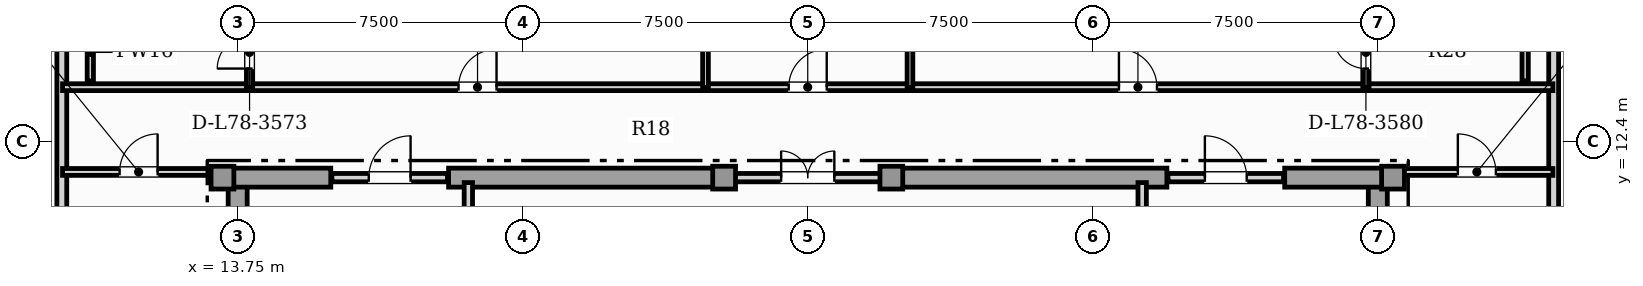
"""IFC4 building model, lengths in metres.
Left out: names, types, materials, properties, quantities, classifications, styles, units other than length and angle.
Written with IfcOpenShell. Run it as: python <this file> out.ifc"""

import sys

from ifc_helpers import new_model, si_unit, direction, frame, frame_2d, origin, origin_2d, place, context, subcontext, project, spatial, rectangle, extrude, element, fill, save


model = new_model("IFC4")
c1 = context("Model", 3, precision=1e-05, world=origin(), true_north=direction((0.0, 1.0)))
c2 = subcontext(c1, "Body", "Model", "MODEL_VIEW")
j1 = project(units=[si_unit("LENGTHUNIT", "METRE"), si_unit("PLANEANGLEUNIT", "RADIAN")], contexts=[c1])
p1 = place(None, origin())
s1 = spatial("IfcSite", under=j1, at=p1, CompositionType="ELEMENT")
p2 = place(p1, origin())
s2 = spatial("IfcBuilding", under=s1, at=p2, CompositionType="ELEMENT")
p3 = place(p2, frame((0.0, 0.0, 316.9)))
s3 = spatial("IfcBuildingStorey", under=s2, at=p3, CompositionType="ELEMENT", Elevation=316.9)
for number, where, z_axis, x_axis in (
    (1, (13.75, 0.92, 0.0), (0.0, 0.0, 1.0), (0.0, 1.0, 0.0)),
    (2, (43.75, 0.92, 0.0), (0.0, 0.0, 1.0), (0.0, 1.0, 0.0)),
):
    element("IfcWall", number, at=place(p3, frame(where, z_axis=z_axis, x_axis=x_axis)), inside=s3, PredefinedType="SHEAR", context=c2, shape_type="SweptSolid", body=[
        extrude(rectangle(XDim=10.53, YDim=0.5, at=frame_2d((5.265, 0.0))), origin(), (0.0, 0.0, 1.0), 3.65),
    ])
p4 = place(p3, frame((13.25, 11.45, 0.0), z_axis=(0.0, 0.0, 1.0), x_axis=(1.0, 0.0, 0.0)))
e3 = element("IfcWall", 3, at=p4, inside=s3, PredefinedType="SHEAR", context=c2, shape_type="SweptSolid", body=[
    extrude(rectangle(XDim=2.95, YDim=0.5, at=frame_2d((1.475, 0.0))), origin(), (0.0, 0.0, 1.0), 3.65),
])
for number, where, z_axis, x_axis in (
    (4, (19.3, 11.45, 0.0), (0.0, 0.0, 1.0), (1.0, 0.0, 0.0)),
    (5, (30.9, 11.45, 0.0), (0.0, 0.0, 1.0), (1.0, 0.0, 0.0)),
):
    element("IfcWall", number, at=place(p3, frame(where, z_axis=z_axis, x_axis=x_axis)), inside=s3, PredefinedType="SHEAR", context=c2, shape_type="SweptSolid", body=[
        extrude(rectangle(XDim=7.3, YDim=0.5, at=frame_2d((3.65, 0.0))), origin(), (0.0, 0.0, 1.0), 3.65),
    ])
p5 = place(p3, frame((41.3, 11.45, 0.0), z_axis=(0.0, 0.0, 1.0), x_axis=(1.0, 0.0, 0.0)))
e6 = element("IfcWall", 6, at=p5, inside=s3, PredefinedType="SHEAR", context=c2, shape_type="SweptSolid", body=[
    extrude(rectangle(XDim=2.95, YDim=0.5, at=frame_2d((1.475, 0.0))), origin(), (0.0, 0.0, 1.0), 3.65),
])
for number, where, z_axis, x_axis in (
    (7, (13.35, 11.45, 0.0), (0.0, 0.0, 1.0), (1.0, 0.0, 0.0)),
    (8, (44.15, 11.45, 0.0), (0.0, 0.0, 1.0), (1.0, 0.0, 0.0)),
    (9, (26.55, 11.45, 0.0), (0.0, 0.0, 1.0), (1.0, 0.0, 0.0)),
    (10, (30.95, 11.45, 0.0), (0.0, 0.0, 1.0), (1.0, 0.0, 0.0)),
):
    element("IfcColumn", number, at=place(p3, frame(where, z_axis=z_axis, x_axis=x_axis)), inside=s3, PredefinedType="COLUMN", context=c2, shape_type="SweptSolid", body=[
        extrude(rectangle(XDim=0.6, YDim=0.6, at=origin_2d()), origin(), (0.0, 0.0, 1.0), 3.85),
    ])
p6 = place(p3, frame((48.377, 3.24, 0.0), z_axis=(0.0, 0.0, 1.0), x_axis=(0.0, 1.0, 0.0)))
e11 = element("IfcWall", 11, at=p6, inside=s3, PredefinedType="SOLIDWALL", context=c2, shape_type="SweptSolid", body=[
    extrude(rectangle(XDim=26.402, YDim=0.26, at=frame_2d((13.201, 0.0))), origin(), (0.0, 0.0, 1.0), 3.65),
])
p7 = place(p6, frame((12.856, 0.0, 0.88)))
e12 = element("IfcOpeningElement", 12, at=p7, cuts=e11, PredefinedType="OPENING", context=c2, shape_type="SweptSolid", body=[
    extrude(rectangle(XDim=1.65, YDim=2.0, at=frame_2d((0.825, 1.0))), frame((0.0, 0.14, 0.0), z_axis=(0.0, -1.0, 0.0), x_axis=(1.0, 0.0, 0.0)), (0.0, 0.0, 1.0), 0.28),
])
p8 = place(p6, frame((15.274, 0.0, 0.88)))
e13 = element("IfcOpeningElement", 13, at=p8, cuts=e11, PredefinedType="OPENING", context=c2, shape_type="SweptSolid", body=[
    extrude(rectangle(XDim=1.65, YDim=2.0, at=frame_2d((0.825, 1.0))), frame((0.0, 0.14, 0.0), z_axis=(0.0, -1.0, 0.0), x_axis=(1.0, 0.0, 0.0)), (0.0, 0.0, 1.0), 0.28),
])
p9 = place(p6, frame((17.961, 0.0, 0.88)))
e14 = element("IfcOpeningElement", 14, at=p9, cuts=e11, PredefinedType="OPENING", context=c2, shape_type="SweptSolid", body=[
    extrude(rectangle(XDim=1.65, YDim=2.0, at=frame_2d((0.825, 1.0))), frame((0.0, 0.14, 0.0), z_axis=(0.0, -1.0, 0.0), x_axis=(1.0, 0.0, 0.0)), (0.0, 0.0, 1.0), 0.28),
])
p10 = place(p6, frame((21.212, 0.0, 0.88)))
e15 = element("IfcOpeningElement", 15, at=p10, cuts=e11, PredefinedType="OPENING", context=c2, shape_type="SweptSolid", body=[
    extrude(rectangle(XDim=1.65, YDim=2.0, at=frame_2d((0.825, 1.0))), frame((0.0, 0.14, 0.0), z_axis=(0.0, -1.0, 0.0), x_axis=(1.0, 0.0, 0.0)), (0.0, 0.0, 1.0), 0.28),
])
p11 = place(p3, frame((9.123, 29.642, 0.0), z_axis=(0.0, 0.0, 1.0), x_axis=(0.0, -1.0, 0.0)))
e16 = element("IfcWall", 16, at=p11, inside=s3, PredefinedType="SOLIDWALL", context=c2, shape_type="SweptSolid", body=[
    extrude(rectangle(XDim=26.402, YDim=0.26, at=frame_2d((13.201, 0.0))), origin(), (0.0, 0.0, 1.0), 3.65),
])
p12 = place(p11, frame((20.352, 0.0, 0.85)))
e17 = element("IfcOpeningElement", 17, at=p12, cuts=e16, PredefinedType="OPENING", context=c2, shape_type="SweptSolid", body=[
    extrude(rectangle(XDim=2.4, YDim=2.0, at=frame_2d((1.2, 1.0))), frame((0.0, 0.14, 0.0), z_axis=(0.0, -1.0, 0.0), x_axis=(1.0, 0.0, 0.0)), (0.0, 0.0, 1.0), 0.28),
])
p13 = place(p11, frame((10.19, 0.0, 0.88)))
e18 = element("IfcOpeningElement", 18, at=p13, cuts=e16, PredefinedType="OPENING", context=c2, shape_type="SweptSolid", body=[
    extrude(rectangle(XDim=1.65, YDim=2.0, at=frame_2d((0.825, 1.0))), frame((0.0, 0.14, 0.0), z_axis=(0.0, -1.0, 0.0), x_axis=(1.0, 0.0, 0.0)), (0.0, 0.0, 1.0), 0.28),
])
p14 = place(p11, frame((7.34, 0.0, 0.88)))
e19 = element("IfcOpeningElement", 19, at=p14, cuts=e16, PredefinedType="OPENING", context=c2, shape_type="SweptSolid", body=[
    extrude(rectangle(XDim=1.65, YDim=2.0, at=frame_2d((0.825, 1.0))), frame((0.0, 0.14, 0.0), z_axis=(0.0, -1.0, 0.0), x_axis=(1.0, 0.0, 0.0)), (0.0, 0.0, 1.0), 0.28),
])
p15 = place(p11, frame((3.721, 0.0, 0.88)))
e20 = element("IfcOpeningElement", 20, at=p15, cuts=e16, PredefinedType="OPENING", context=c2, shape_type="SweptSolid", body=[
    extrude(rectangle(XDim=1.65, YDim=2.0, at=frame_2d((0.825, 1.0))), frame((0.0, 0.14, 0.0), z_axis=(0.0, -1.0, 0.0), x_axis=(1.0, 0.0, 0.0)), (0.0, 0.0, 1.0), 0.28),
])
p16 = place(p3, frame((19.82, 8.52, 0.0), z_axis=(0.0, 0.0, 1.0), x_axis=(0.0, 1.0, 0.0)))
e21 = element("IfcWall", 21, at=p16, inside=s3, PredefinedType="SOLIDWALL", context=c2, shape_type="SweptSolid", body=[
    extrude(rectangle(XDim=2.8, YDim=0.22, at=frame_2d((1.4, 0.0))), origin(), (0.0, 0.0, 1.0), 3.106),
])
p17 = place(p16, frame((0.85, 0.0, 0.0)))
e22 = element("IfcOpeningElement", 22, at=p17, cuts=e21, PredefinedType="OPENING", context=c2, shape_type="SweptSolid", body=[
    extrude(rectangle(XDim=1.1, YDim=2.2, at=frame_2d((0.55, 1.1))), frame((0.0, 0.12, 0.0), z_axis=(0.0, -1.0, 0.0), x_axis=(1.0, 0.0, 0.0)), (0.0, 0.0, 1.0), 0.24),
])
p18 = place(p3, frame((37.55, 8.52, 0.0), z_axis=(0.0, 0.0, 1.0), x_axis=(0.0, 1.0, 0.0)))
e23 = element("IfcWall", 23, at=p18, inside=s3, PredefinedType="SOLIDWALL", context=c2, shape_type="SweptSolid", body=[
    extrude(rectangle(XDim=2.8, YDim=0.22, at=frame_2d((1.4, 0.0))), origin(), (0.0, 0.0, 1.0), 3.106),
])
p19 = place(p18, frame((0.85, 0.0, 0.0)))
e24 = element("IfcOpeningElement", 24, at=p19, cuts=e23, PredefinedType="OPENING", context=c2, shape_type="SweptSolid", body=[
    extrude(rectangle(XDim=1.1, YDim=2.2, at=frame_2d((0.55, 1.1))), frame((0.0, 0.12, 0.0), z_axis=(0.0, -1.0, 0.0), x_axis=(1.0, 0.0, 0.0)), (0.0, 0.0, 1.0), 0.24),
])
p20 = place(p3, frame((16.23, 11.45, 0.0), z_axis=(0.0, 0.0, 1.0), x_axis=(1.0, 0.0, 0.0)))
e25 = element("IfcWall", 25, at=p20, inside=s3, PredefinedType="SOLIDWALL", context=c2, shape_type="SweptSolid", body=[
    extrude(rectangle(XDim=3.04, YDim=0.22, at=frame_2d((1.52, 0.0))), origin(), (0.0, 0.0, 1.0), 3.65),
])
p21 = place(p20, frame((0.97, 0.0, 0.0)))
e26 = element("IfcOpeningElement", 26, at=p21, cuts=e25, PredefinedType="OPENING", context=c2, shape_type="SweptSolid", body=[
    extrude(rectangle(XDim=1.1, YDim=2.2, at=frame_2d((0.55, 1.1))), frame((0.0, 0.12, 0.0), z_axis=(0.0, -1.0, 0.0), x_axis=(1.0, 0.0, 0.0)), (0.0, 0.0, 1.0), 0.24),
])
p22 = place(p3, frame((26.63, 11.45, 0.0), z_axis=(0.0, 0.0, 1.0), x_axis=(1.0, 0.0, 0.0)))
e27 = element("IfcWall", 27, at=p22, inside=s3, PredefinedType="SOLIDWALL", context=c2, shape_type="SweptSolid", body=[
    extrude(rectangle(XDim=4.24, YDim=0.22, at=frame_2d((2.12, 0.0))), origin(), (0.0, 0.0, 1.0), 3.65),
])
p23 = place(p22, frame((1.42, 0.0, 0.0)))
e28 = element("IfcOpeningElement", 28, at=p23, cuts=e27, PredefinedType="OPENING", context=c2, shape_type="SweptSolid", body=[
    extrude(rectangle(XDim=1.4, YDim=2.2, at=frame_2d((0.7, 1.1))), frame((0.0, 0.12, 0.0), z_axis=(0.0, -1.0, 0.0), x_axis=(1.0, 0.0, 0.0)), (0.0, 0.0, 1.0), 0.24),
])
p24 = place(p3, frame((38.23, 11.45, 0.0), z_axis=(0.0, 0.0, 1.0), x_axis=(1.0, 0.0, 0.0)))
e29 = element("IfcWall", 29, at=p24, inside=s3, PredefinedType="SOLIDWALL", context=c2, shape_type="SweptSolid", body=[
    extrude(rectangle(XDim=3.04, YDim=0.22, at=frame_2d((1.52, 0.0))), origin(), (0.0, 0.0, 1.0), 3.65),
])
p25 = place(p24, frame((0.97, 0.0, 0.0)))
e30 = element("IfcOpeningElement", 30, at=p25, cuts=e29, PredefinedType="OPENING", context=c2, shape_type="SweptSolid", body=[
    extrude(rectangle(XDim=1.1, YDim=2.2, at=frame_2d((0.55, 1.1))), frame((0.0, 0.12, 0.0), z_axis=(0.0, -1.0, 0.0), x_axis=(1.0, 0.0, 0.0)), (0.0, 0.0, 1.0), 0.24),
])
p26 = place(p3, frame((9.143, 11.6, 0.0), z_axis=(0.0, 0.0, 1.0), x_axis=(1.0, 0.0, 0.0)))
e31 = element("IfcWall", 31, at=p26, inside=s3, PredefinedType="PARTITIONING", context=c2, shape_type="SweptSolid", body=[
    extrude(rectangle(XDim=4.002, YDim=0.18, at=frame_2d((2.001, 0.0))), origin(), (0.0, 0.0, 1.0), 3.65),
])
p27 = place(p26, frame((1.501, 0.0, 0.0)))
e32 = element("IfcOpeningElement", 32, at=p27, cuts=e31, PredefinedType="OPENING", context=c2, shape_type="SweptSolid", body=[
    extrude(rectangle(XDim=1.0, YDim=2.15, at=frame_2d((0.5, 1.075))), frame((0.0, 0.1, 0.0), z_axis=(0.0, -1.0, 0.0), x_axis=(1.0, 0.0, 0.0)), (0.0, 0.0, 1.0), 0.2),
])
p28 = place(p3, frame((44.355, 11.6, 0.0), z_axis=(0.0, 0.0, 1.0), x_axis=(1.0, 0.0, 0.0)))
e33 = element("IfcWall", 33, at=p28, inside=s3, PredefinedType="PARTITIONING", context=c2, shape_type="SweptSolid", body=[
    extrude(rectangle(XDim=4.002, YDim=0.18, at=frame_2d((2.001, 0.0))), origin(), (0.0, 0.0, 1.0), 3.65),
])
p29 = place(p28, frame((1.501, 0.0, 0.0)))
e34 = element("IfcOpeningElement", 34, at=p29, cuts=e33, PredefinedType="OPENING", context=c2, shape_type="SweptSolid", body=[
    extrude(rectangle(XDim=1.0, YDim=2.15, at=frame_2d((0.5, 1.075))), frame((0.0, 0.1, 0.0), z_axis=(0.0, -1.0, 0.0), x_axis=(1.0, 0.0, 0.0)), (0.0, 0.0, 1.0), 0.2),
])
p30 = place(p3, frame((14.058, 13.83, 0.0), z_axis=(0.0, 0.0, 1.0), x_axis=(1.0, 0.0, 0.0)))
e35 = element("IfcWall", 35, at=p30, inside=s3, PredefinedType="PARTITIONING", context=c2, shape_type="SweptSolid", body=[
    extrude(rectangle(XDim=12.007, YDim=0.18, at=frame_2d((6.003, 0.0))), origin(), (0.0, 0.0, 1.0), 3.65),
])
p31 = place(p30, frame((5.503, 0.0, 0.0)))
e36 = element("IfcOpeningElement", 36, at=p31, cuts=e35, PredefinedType="OPENING", context=c2, shape_type="SweptSolid", body=[
    extrude(rectangle(XDim=1.0, YDim=2.15, at=frame_2d((0.5, 1.075))), frame((0.0, 0.1, 0.0), z_axis=(0.0, -1.0, 0.0), x_axis=(1.0, 0.0, 0.0)), (0.0, 0.0, 1.0), 0.2),
])
p32 = place(p3, frame((31.435, 13.83, 0.0), z_axis=(0.0, 0.0, 1.0), x_axis=(1.0, 0.0, 0.0)))
e37 = element("IfcWall", 37, at=p32, inside=s3, PredefinedType="PARTITIONING", context=c2, shape_type="SweptSolid", body=[
    extrude(rectangle(XDim=12.007, YDim=0.18, at=frame_2d((6.003, 0.0))), origin(), (0.0, 0.0, 1.0), 3.65),
])
p33 = place(p32, frame((5.503, 0.0, 0.0)))
e38 = element("IfcOpeningElement", 38, at=p33, cuts=e37, PredefinedType="OPENING", context=c2, shape_type="SweptSolid", body=[
    extrude(rectangle(XDim=1.0, YDim=2.15, at=frame_2d((0.5, 1.075))), frame((0.0, 0.1, 0.0), z_axis=(0.0, -1.0, 0.0), x_axis=(1.0, 0.0, 0.0)), (0.0, 0.0, 1.0), 0.2),
])
p34 = place(p3, frame((26.095, 13.83, 0.0), z_axis=(0.0, 0.0, 1.0), x_axis=(1.0, 0.0, 0.0)))
e39 = element("IfcWall", 39, at=p34, inside=s3, PredefinedType="PARTITIONING", context=c2, shape_type="SweptSolid", body=[
    extrude(rectangle(XDim=5.31, YDim=0.18, at=frame_2d((2.655, 0.0))), origin(), (0.0, 0.0, 1.0), 3.65),
])
p35 = place(p34, frame((2.155, 0.0, 0.0)))
e40 = element("IfcOpeningElement", 40, at=p35, cuts=e39, PredefinedType="OPENING", context=c2, shape_type="SweptSolid", body=[
    extrude(rectangle(XDim=1.0, YDim=2.15, at=frame_2d((0.5, 1.075))), frame((0.0, 0.1, 0.0), z_axis=(0.0, -1.0, 0.0), x_axis=(1.0, 0.0, 0.0)), (0.0, 0.0, 1.0), 0.2),
])
for number, where, z_axis, x_axis in (
    (41, (9.143, 13.83, 0.0), (0.0, 0.0, 1.0), (1.0, 0.0, 0.0)),
    (42, (43.472, 13.83, 0.0), (0.0, 0.0, 1.0), (1.0, 0.0, 0.0)),
):
    element("IfcWall", number, at=place(p3, frame(where, z_axis=z_axis, x_axis=x_axis)), inside=s3, PredefinedType="PARTITIONING", context=c2, shape_type="SweptSolid", body=[
        extrude(rectangle(XDim=4.885, YDim=0.18, at=frame_2d((2.443, 0.0))), origin(), (0.0, 0.0, 1.0), 3.65),
    ])
p36 = place(p3, frame((26.06, 13.825, 0.0), z_axis=(0.0, 0.0, 1.0), x_axis=(0.0, 1.0, 0.0)))
e43 = element("IfcWall", 43, at=p36, inside=s3, PredefinedType="PARTITIONING", context=c2, shape_type="SweptSolid", body=[
    extrude(rectangle(XDim=9.867, YDim=0.15, at=frame_2d((4.934, 0.0))), origin(), (0.0, 0.0, 1.0), 3.65),
])
p37 = place(p36, frame((4.473, 0.0, 0.0)))
e44 = element("IfcOpeningElement", 44, at=p37, cuts=e43, PredefinedType="OPENING", context=c2, shape_type="SweptSolid", body=[
    extrude(rectangle(XDim=0.92, YDim=2.1, at=frame_2d((0.46, 1.05))), frame((0.0, 0.085, 0.0), z_axis=(0.0, -1.0, 0.0), x_axis=(1.0, 0.0, 0.0)), (0.0, 0.0, 1.0), 0.17),
])
p38 = place(p3, frame((14.063, 13.825, 0.0), z_axis=(0.0, 0.0, 1.0), x_axis=(0.0, 1.0, 0.0)))
e45 = element("IfcWall", 45, at=p38, inside=s3, PredefinedType="PLUMBINGWALL", context=c2, shape_type="SweptSolid", body=[
    extrude(rectangle(XDim=1.84, YDim=0.165, at=frame_2d((0.92, 0.0))), origin(), (0.0, 0.0, 1.0), 3.65),
])
p39 = place(p38, frame((0.495, 0.0, 0.0)))
e46 = element("IfcOpeningElement", 46, at=p39, cuts=e45, PredefinedType="OPENING", context=c2, shape_type="SweptSolid", body=[
    extrude(rectangle(XDim=0.85, YDim=2.1, at=frame_2d((0.425, 1.05))), frame((0.0, 0.093, 0.0), z_axis=(0.0, -1.0, 0.0), x_axis=(1.0, 0.0, 0.0)), (0.0, 0.0, 1.0), 0.185),
])
p40 = place(p3, frame((31.44, 13.825, 0.0), z_axis=(0.0, 0.0, 1.0), x_axis=(0.0, 1.0, 0.0)))
e47 = element("IfcWall", 47, at=p40, inside=s3, PredefinedType="PARTITIONING", context=c2, shape_type="SweptSolid", body=[
    extrude(rectangle(XDim=9.867, YDim=0.15, at=frame_2d((4.934, 0.0))), origin(), (0.0, 0.0, 1.0), 3.65),
])
p41 = place(p40, frame((4.473, 0.0, 0.0)))
e48 = element("IfcOpeningElement", 48, at=p41, cuts=e47, PredefinedType="OPENING", context=c2, shape_type="SweptSolid", body=[
    extrude(rectangle(XDim=0.92, YDim=2.1, at=frame_2d((0.46, 1.05))), frame((0.0, 0.085, 0.0), z_axis=(0.0, -1.0, 0.0), x_axis=(1.0, 0.0, 0.0)), (0.0, 0.0, 1.0), 0.17),
])
p42 = place(p3, frame((43.437, 13.825, 0.0), z_axis=(0.0, 0.0, 1.0), x_axis=(0.0, 1.0, 0.0)))
e49 = element("IfcWall", 49, at=p42, inside=s3, PredefinedType="PLUMBINGWALL", context=c2, shape_type="SweptSolid", body=[
    extrude(rectangle(XDim=1.84, YDim=0.165, at=frame_2d((0.92, 0.0))), origin(), (0.0, 0.0, 1.0), 3.65),
])
p43 = place(p42, frame((0.495, 0.0, 0.0)))
e50 = element("IfcOpeningElement", 50, at=p43, cuts=e49, PredefinedType="OPENING", context=c2, shape_type="SweptSolid", body=[
    extrude(rectangle(XDim=0.85, YDim=2.1, at=frame_2d((0.425, 1.05))), frame((0.0, 0.093, 0.0), z_axis=(0.0, -1.0, 0.0), x_axis=(1.0, 0.0, 0.0)), (0.0, 0.0, 1.0), 0.185),
])
for number, where, z_axis, x_axis in (
    (51, (9.873, 13.995, 0.0), (0.0, 0.0, 1.0), (0.0, 1.0, 0.0)),
    (52, (47.627, 15.495, 0.0), (0.0, 0.0, 1.0), (0.0, -1.0, 0.0)),
):
    element("IfcWall", number, at=place(p3, frame(where, z_axis=z_axis, x_axis=x_axis)), inside=s3, PredefinedType="PLUMBINGWALL", context=c2, shape_type="SweptSolid", body=[
        extrude(rectangle(XDim=1.5, YDim=0.165, at=frame_2d((0.75, 0.0))), origin(), (0.0, 0.0, 1.0), 3.65),
    ])
p44 = place(p21, origin())
e53 = element("IfcDoor", 53, at=p44, inside=s3, OperationType="SINGLE_SWING_RIGHT", PredefinedType="DOOR", context=c2, shape_type="SweptSolid", body=[
    extrude(rectangle(XDim=1.1, YDim=2.2, at=frame_2d((0.55, 1.1))), frame((0.0, 0.025, 0.0), z_axis=(0.0, -1.0, 0.0), x_axis=(1.0, 0.0, 0.0)), (0.0, 0.0, 1.0), 0.05),
])
fill(e26, e53)
p45 = place(p23, origin())
e54 = element("IfcDoor", 54, at=p45, inside=s3, OperationType="DOUBLE_DOOR_SINGLE_SWING", PredefinedType="DOOR", context=c2, shape_type="SweptSolid", body=[
    extrude(rectangle(XDim=1.4, YDim=2.2, at=frame_2d((0.7, 1.1))), frame((0.0, 0.025, 0.0), z_axis=(0.0, -1.0, 0.0), x_axis=(1.0, 0.0, 0.0)), (0.0, 0.0, 1.0), 0.05),
])
fill(e28, e54)
p46 = place(p25, origin())
e55 = element("IfcDoor", 55, at=p46, inside=s3, OperationType="SINGLE_SWING_LEFT", PredefinedType="DOOR", context=c2, shape_type="SweptSolid", body=[
    extrude(rectangle(XDim=1.1, YDim=2.2, at=frame_2d((0.55, 1.1))), frame((0.0, 0.025, 0.0), z_axis=(0.0, -1.0, 0.0), x_axis=(1.0, 0.0, 0.0)), (0.0, 0.0, 1.0), 0.05),
])
fill(e30, e55)
p47 = place(p27, origin())
e56 = element("IfcDoor", 56, at=p47, inside=s3, OperationType="SINGLE_SWING_RIGHT", PredefinedType="DOOR", context=c2, shape_type="SweptSolid", body=[
    extrude(rectangle(XDim=1.0, YDim=2.15, at=frame_2d((0.5, 1.075))), frame((0.0, 0.025, 0.0), z_axis=(0.0, -1.0, 0.0), x_axis=(1.0, 0.0, 0.0)), (0.0, 0.0, 1.0), 0.05),
])
fill(e32, e56)
p48 = place(p29, origin())
e57 = element("IfcDoor", 57, at=p48, inside=s3, OperationType="SINGLE_SWING_LEFT", PredefinedType="DOOR", context=c2, shape_type="SweptSolid", body=[
    extrude(rectangle(XDim=1.0, YDim=2.15, at=frame_2d((0.5, 1.075))), frame((0.0, 0.025, 0.0), z_axis=(0.0, -1.0, 0.0), x_axis=(1.0, 0.0, 0.0)), (0.0, 0.0, 1.0), 0.05),
])
fill(e34, e57)
p49 = place(p31, origin())
e58 = element("IfcDoor", 58, at=p49, inside=s3, OperationType="SINGLE_SWING_RIGHT", PredefinedType="DOOR", context=c2, shape_type="SweptSolid", body=[
    extrude(rectangle(XDim=1.0, YDim=2.15, at=frame_2d((0.5, 1.075))), frame((0.0, 0.025, 0.0), z_axis=(0.0, -1.0, 0.0), x_axis=(1.0, 0.0, 0.0)), (0.0, 0.0, 1.0), 0.05),
])
fill(e36, e58)
p50 = place(p33, origin())
e59 = element("IfcDoor", 59, at=p50, inside=s3, OperationType="SINGLE_SWING_LEFT", PredefinedType="DOOR", context=c2, shape_type="SweptSolid", body=[
    extrude(rectangle(XDim=1.0, YDim=2.15, at=frame_2d((0.5, 1.075))), frame((0.0, 0.025, 0.0), z_axis=(0.0, -1.0, 0.0), x_axis=(1.0, 0.0, 0.0)), (0.0, 0.0, 1.0), 0.05),
])
fill(e38, e59)
p51 = place(p35, origin())
e60 = element("IfcDoor", 60, at=p51, inside=s3, OperationType="SINGLE_SWING_RIGHT", PredefinedType="DOOR", context=c2, shape_type="SweptSolid", body=[
    extrude(rectangle(XDim=1.0, YDim=2.15, at=frame_2d((0.5, 1.075))), frame((0.0, 0.025, 0.0), z_axis=(0.0, -1.0, 0.0), x_axis=(1.0, 0.0, 0.0)), (0.0, 0.0, 1.0), 0.05),
])
fill(e40, e60)
p52 = place(p39, origin())
e61 = element("IfcDoor", 61, at=p52, inside=s3, OperationType="SINGLE_SWING_LEFT", PredefinedType="DOOR", context=c2, shape_type="SweptSolid", body=[
    extrude(rectangle(XDim=0.85, YDim=2.1, at=frame_2d((0.425, 1.05))), frame((0.0, 0.025, 0.0), z_axis=(0.0, -1.0, 0.0), x_axis=(1.0, 0.0, 0.0)), (0.0, 0.0, 1.0), 0.05),
])
fill(e46, e61)
p53 = place(p43, origin())
e62 = element("IfcDoor", 62, at=p53, inside=s3, OperationType="SINGLE_SWING_RIGHT", PredefinedType="DOOR", context=c2, shape_type="SweptSolid", body=[
    extrude(rectangle(XDim=0.85, YDim=2.1, at=frame_2d((0.425, 1.05))), frame((0.0, 0.025, 0.0), z_axis=(0.0, -1.0, 0.0), x_axis=(1.0, 0.0, 0.0)), (0.0, 0.0, 1.0), 0.05),
])
fill(e50, e62)
save(model, sys.argv[1])
